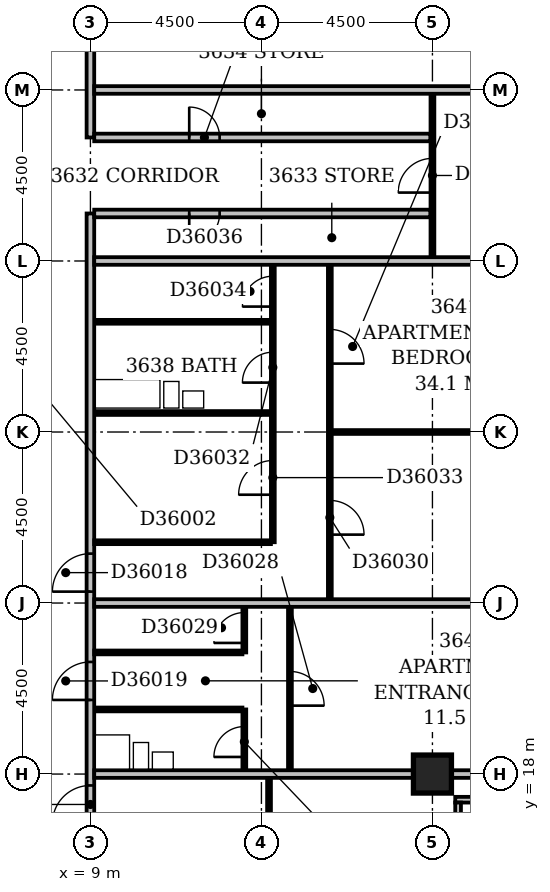
"""IFC4 building model, lengths in metres.
Left out: names, types, materials, properties, quantities, classifications, styles, units other than length and angle.
Written with IfcOpenShell. Run it as: python <this file> out.ifc"""

import sys

from ifc_helpers import new_model, si_unit, direction, frame, frame_2d, origin, origin_2d, place, context, subcontext, project, spatial, rectangle, extrude, element, fill, save


model = new_model("IFC4")
c1 = context("Model", 3, precision=1e-05, world=origin(), true_north=direction((0.0, 1.0)))
c2 = subcontext(c1, "Body", "Model", "MODEL_VIEW")
j1 = project(units=[si_unit("LENGTHUNIT", "METRE"), si_unit("PLANEANGLEUNIT", "RADIAN")], contexts=[c1])
p1 = place(None, origin())
s1 = spatial("IfcSite", under=j1, at=p1, CompositionType="ELEMENT")
p2 = place(p1, origin())
s2 = spatial("IfcBuilding", under=s1, at=p2, CompositionType="ELEMENT")
p3 = place(p2, frame((0.0, 0.0, 144.8)))
s3 = spatial("IfcBuildingStorey", under=s2, at=p3, CompositionType="ELEMENT", Elevation=144.8)
p4 = place(p3, frame((18.0, 18.0, -0.3), z_axis=(0.0, 0.0, 1.0), x_axis=(1.0, 0.0, 0.0)))
e1 = element("IfcColumn", 1, at=p4, inside=s3, PredefinedType="COLUMN", context=c2, shape_type="SweptSolid", body=[
    extrude(rectangle(XDim=1.0, YDim=1.0, at=origin_2d()), origin(), (0.0, 0.0, 1.0), 3.6),
])
p5 = place(p3, frame((18.675, 8.4, 0.0), z_axis=(0.0, 0.0, 1.0), x_axis=(0.0, 1.0, 0.0)))
e2 = element("IfcWall", 2, at=p5, inside=s3, PredefinedType="STANDARD", context=c2, shape_type="SweptSolid", body=[
    extrude(rectangle(XDim=8.85, YDim=0.15, at=frame_2d((4.425, 0.0))), origin(), (0.0, 0.0, 1.0), 2.7),
])
p6 = place(p5, frame((1.368, 0.0, 0.6)))
e3 = element("IfcOpeningElement", 3, at=p6, cuts=e2, PredefinedType="OPENING", context=c2, shape_type="SweptSolid", body=[
    extrude(rectangle(XDim=0.6, YDim=1.8, at=frame_2d((0.3, 0.9))), frame((0.0, 0.087, 0.0), z_axis=(0.0, -1.0, 0.0), x_axis=(1.0, 0.0, 0.0)), (0.0, 0.0, 1.0), 0.174),
])
p7 = place(p5, frame((3.422, 0.0, 0.6)))
e4 = element("IfcOpeningElement", 4, at=p7, cuts=e2, PredefinedType="OPENING", context=c2, shape_type="SweptSolid", body=[
    extrude(rectangle(XDim=0.9, YDim=1.8, at=frame_2d((0.45, 0.9))), frame((0.0, 0.087, 0.0), z_axis=(0.0, -1.0, 0.0), x_axis=(1.0, 0.0, 0.0)), (0.0, 0.0, 1.0), 0.174),
])
p8 = place(p5, frame((6.15, 0.0, 0.6)))
e5 = element("IfcOpeningElement", 5, at=p8, cuts=e2, PredefinedType="OPENING", context=c2, shape_type="SweptSolid", body=[
    extrude(rectangle(XDim=2.4, YDim=1.8, at=frame_2d((1.2, 0.9))), frame((0.0, 0.087, 0.0), z_axis=(0.0, -1.0, 0.0), x_axis=(1.0, 0.0, 0.0)), (0.0, 0.0, 1.0), 0.174),
])
p9 = place(p3, frame((18.6, 17.325, 0.0), z_axis=(0.0, 0.0, 1.0), x_axis=(1.0, 0.0, 0.0)))
e6 = element("IfcWall", 6, at=p9, inside=s3, PredefinedType="STANDARD", context=c2, shape_type="SweptSolid", body=[
    extrude(rectangle(XDim=4.65, YDim=0.15, at=frame_2d((2.325, 0.0))), origin(), (0.0, 0.0, 1.0), 2.7),
])
p10 = place(p9, frame((0.45, 0.0, 0.6)))
e7 = element("IfcOpeningElement", 7, at=p10, cuts=e6, PredefinedType="OPENING", context=c2, shape_type="SweptSolid", body=[
    extrude(rectangle(XDim=2.4, YDim=1.8, at=frame_2d((1.2, 0.9))), frame((0.0, 0.087, 0.0), z_axis=(0.0, -1.0, 0.0), x_axis=(1.0, 0.0, 0.0)), (0.0, 0.0, 1.0), 0.174),
])
p11 = place(p3, frame((9.0, 5.0, 0.0), z_axis=(0.0, 0.0, 1.0), x_axis=(0.0, 1.0, 0.0)))
e8 = element("IfcWall", 8, at=p11, inside=s3, PredefinedType="PARTITIONING", context=c2, shape_type="SweptSolid", body=[
    extrude(rectangle(XDim=27.75, YDim=0.2, at=frame_2d((13.875, 0.0))), origin(), (0.0, 0.0, 1.0), 3.3),
])
p12 = place(p11, frame((17.8, 0.0, 0.0)))
e9 = element("IfcOpeningElement", 9, at=p12, cuts=e8, PredefinedType="OPENING", context=c2, shape_type="SweptSolid", body=[
    extrude(rectangle(XDim=1.0, YDim=2.1, at=frame_2d((0.5, 1.05))), frame((0.0, 0.112, 0.0), z_axis=(0.0, -1.0, 0.0), x_axis=(1.0, 0.0, 0.0)), (0.0, 0.0, 1.0), 0.224),
])
p13 = place(p11, frame((14.95, 0.0, 0.0)))
e10 = element("IfcOpeningElement", 10, at=p13, cuts=e8, PredefinedType="OPENING", context=c2, shape_type="SweptSolid", body=[
    extrude(rectangle(XDim=1.0, YDim=2.1, at=frame_2d((0.5, 1.05))), frame((0.0, 0.112, 0.0), z_axis=(0.0, -1.0, 0.0), x_axis=(1.0, 0.0, 0.0)), (0.0, 0.0, 1.0), 0.224),
])
p14 = place(p11, frame((11.7, 0.0, 0.0)))
e11 = element("IfcOpeningElement", 11, at=p14, cuts=e8, PredefinedType="OPENING", context=c2, shape_type="SweptSolid", body=[
    extrude(rectangle(XDim=1.0, YDim=2.1, at=frame_2d((0.5, 1.05))), frame((0.0, 0.112, 0.0), z_axis=(0.0, -1.0, 0.0), x_axis=(1.0, 0.0, 0.0)), (0.0, 0.0, 1.0), 0.224),
])
p15 = place(p11, frame((1.5, 0.0, 0.0)))
e12 = element("IfcOpeningElement", 12, at=p15, cuts=e8, PredefinedType="OPENING", context=c2, shape_type="SweptSolid", body=[
    extrude(rectangle(XDim=0.9, YDim=2.1, at=frame_2d((0.45, 1.05))), frame((0.0, 0.112, 0.0), z_axis=(0.0, -1.0, 0.0), x_axis=(1.0, 0.0, 0.0)), (0.0, 0.0, 1.0), 0.224),
])
p16 = place(p3, frame((13.7, 9.5, 0.0), z_axis=(0.0, 0.0, 1.0), x_axis=(0.0, 1.0, 0.0)))
e13 = element("IfcWall", 13, at=p16, inside=s3, PredefinedType="PARTITIONING", context=c2, shape_type="SweptSolid", body=[
    extrude(rectangle(XDim=8.4, YDim=0.1, at=frame_2d((4.2, 0.0))), origin(), (0.0, 0.0, 1.0), 3.3),
])
p17 = place(p16, frame((1.3, 0.0, 0.0)))
e14 = element("IfcOpeningElement", 14, at=p17, cuts=e13, PredefinedType="OPENING", context=c2, shape_type="SweptSolid", body=[
    extrude(rectangle(XDim=0.9, YDim=2.1, at=frame_2d((0.45, 1.05))), frame((0.0, 0.062, 0.0), z_axis=(0.0, -1.0, 0.0), x_axis=(1.0, 0.0, 0.0)), (0.0, 0.0, 1.0), 0.124),
])
p18 = place(p16, frame((5.8, 0.0, 0.0)))
e15 = element("IfcOpeningElement", 15, at=p18, cuts=e13, PredefinedType="OPENING", context=c2, shape_type="SweptSolid", body=[
    extrude(rectangle(XDim=0.9, YDim=2.1, at=frame_2d((0.45, 1.05))), frame((0.0, 0.062, 0.0), z_axis=(0.0, -1.0, 0.0), x_axis=(1.0, 0.0, 0.0)), (0.0, 0.0, 1.0), 0.124),
])
p19 = place(p3, frame((9.1, 18.0, 0.0), z_axis=(0.0, 0.0, 1.0), x_axis=(1.0, 0.0, 0.0)))
e16 = element("IfcWall", 16, at=p19, inside=s3, PredefinedType="PARTITIONING", context=c2, shape_type="SweptSolid", body=[
    extrude(rectangle(XDim=8.4, YDim=0.2, at=frame_2d((4.2, 0.0))), origin(), (0.0, 0.0, 1.0), 2.6),
])
p20 = place(p3, frame((18.5, 18.0, 0.0), z_axis=(0.0, 0.0, 1.0), x_axis=(1.0, 0.0, 0.0)))
e17 = element("IfcWall", 17, at=p20, inside=s3, PredefinedType="PARTITIONING", context=c2, shape_type="SweptSolid", body=[
    extrude(rectangle(XDim=3.5, YDim=0.2, at=frame_2d((1.75, 0.0))), origin(), (0.0, 0.0, 1.0), 2.7),
])
p21 = place(p3, frame((13.05, 18.1, 0.0), z_axis=(0.0, 0.0, 1.0), x_axis=(0.0, 1.0, 0.0)))
e18 = element("IfcWall", 18, at=p21, inside=s3, PredefinedType="PARTITIONING", context=c2, shape_type="SweptSolid", body=[
    extrude(rectangle(XDim=1.6, YDim=0.1, at=frame_2d((0.8, 0.0))), origin(), (0.0, 0.0, 1.0), 3.3),
])
p22 = place(p21, frame((0.35, 0.0, 0.0)))
e19 = element("IfcOpeningElement", 19, at=p22, cuts=e18, PredefinedType="OPENING", context=c2, shape_type="SweptSolid", body=[
    extrude(rectangle(XDim=0.8, YDim=2.1, at=frame_2d((0.4, 1.05))), frame((0.0, 0.062, 0.0), z_axis=(0.0, -1.0, 0.0), x_axis=(1.0, 0.0, 0.0)), (0.0, 0.0, 1.0), 0.124),
])
p23 = place(p3, frame((14.25, 18.1, 0.0), z_axis=(0.0, 0.0, 1.0), x_axis=(0.0, 1.0, 0.0)))
e20 = element("IfcWall", 20, at=p23, inside=s3, PredefinedType="PARTITIONING", context=c2, shape_type="SweptSolid", body=[
    extrude(rectangle(XDim=4.3, YDim=0.1, at=frame_2d((2.15, 0.0))), origin(), (0.0, 0.0, 1.0), 3.3),
])
p24 = place(p23, frame((1.7, 0.0, 0.0)))
e21 = element("IfcOpeningElement", 21, at=p24, cuts=e20, PredefinedType="OPENING", context=c2, shape_type="SweptSolid", body=[
    extrude(rectangle(XDim=0.9, YDim=2.1, at=frame_2d((0.45, 1.05))), frame((0.0, 0.062, 0.0), z_axis=(0.0, -1.0, 0.0), x_axis=(1.0, 0.0, 0.0)), (0.0, 0.0, 1.0), 0.124),
])
p25 = place(p3, frame((9.1, 19.7, 0.0), z_axis=(0.0, 0.0, 1.0), x_axis=(1.0, 0.0, 0.0)))
e22 = element("IfcWall", 22, at=p25, inside=s3, PredefinedType="PLUMBINGWALL", context=c2, shape_type="SweptSolid", body=[
    extrude(rectangle(XDim=3.9, YDim=0.1, at=frame_2d((1.95, 0.0))), origin(), (0.0, 0.0, 1.0), 3.3),
])
p26 = place(p3, frame((9.1, 21.2, 0.0), z_axis=(0.0, 0.0, 1.0), x_axis=(1.0, 0.0, 0.0)))
e23 = element("IfcWall", 23, at=p26, inside=s3, PredefinedType="PARTITIONING", context=c2, shape_type="SweptSolid", body=[
    extrude(rectangle(XDim=3.9, YDim=0.1, at=frame_2d((1.95, 0.0))), origin(), (0.0, 0.0, 1.0), 3.3),
])
p27 = place(p3, frame((13.05, 21.2, 0.0), z_axis=(0.0, 0.0, 1.0), x_axis=(0.0, 1.0, 0.0)))
e24 = element("IfcWall", 24, at=p27, inside=s3, PredefinedType="PARTITIONING", context=c2, shape_type="SweptSolid", body=[
    extrude(rectangle(XDim=1.2, YDim=0.1, at=frame_2d((0.6, 0.0))), origin(), (0.0, 0.0, 1.0), 3.3),
])
p28 = place(p27, frame((0.25, 0.0, 0.0)))
e25 = element("IfcOpeningElement", 25, at=p28, cuts=e24, PredefinedType="OPENING", context=c2, shape_type="SweptSolid", body=[
    extrude(rectangle(XDim=0.8, YDim=2.1, at=frame_2d((0.4, 1.05))), frame((0.0, 0.062, 0.0), z_axis=(0.0, -1.0, 0.0), x_axis=(1.0, 0.0, 0.0)), (0.0, 0.0, 1.0), 0.124),
])
p29 = place(p3, frame((9.1, 22.5, 0.0), z_axis=(0.0, 0.0, 1.0), x_axis=(1.0, 0.0, 0.0)))
e26 = element("IfcWall", 26, at=p29, inside=s3, PredefinedType="PARTITIONING", context=c2, shape_type="SweptSolid", body=[
    extrude(rectangle(XDim=12.9, YDim=0.2, at=frame_2d((6.45, 0.0))), origin(), (0.0, 0.0, 1.0), 3.3),
])
p30 = place(p3, frame((15.3, 22.6, 0.0), z_axis=(0.0, 0.0, 1.0), x_axis=(0.0, 1.0, 0.0)))
e27 = element("IfcWall", 27, at=p30, inside=s3, PredefinedType="PARTITIONING", context=c2, shape_type="SweptSolid", body=[
    extrude(rectangle(XDim=8.8, YDim=0.1, at=frame_2d((4.4, 0.0))), origin(), (0.0, 0.0, 1.0), 3.3),
])
p31 = place(p30, frame((1.7, 0.0, 0.0)))
e28 = element("IfcOpeningElement", 28, at=p31, cuts=e27, PredefinedType="OPENING", context=c2, shape_type="SweptSolid", body=[
    extrude(rectangle(XDim=0.9, YDim=2.1, at=frame_2d((0.45, 1.05))), frame((0.0, 0.062, 0.0), z_axis=(0.0, -1.0, 0.0), x_axis=(1.0, 0.0, 0.0)), (0.0, 0.0, 1.0), 0.124),
])
p32 = place(p30, frame((6.2, 0.0, 0.0)))
e29 = element("IfcOpeningElement", 29, at=p32, cuts=e27, PredefinedType="OPENING", context=c2, shape_type="SweptSolid", body=[
    extrude(rectangle(XDim=0.9, YDim=2.1, at=frame_2d((0.45, 1.05))), frame((0.0, 0.062, 0.0), z_axis=(0.0, -1.0, 0.0), x_axis=(1.0, 0.0, 0.0)), (0.0, 0.0, 1.0), 0.124),
])
p33 = place(p3, frame((9.1, 24.1, 0.0), z_axis=(0.0, 0.0, 1.0), x_axis=(1.0, 0.0, 0.0)))
e30 = element("IfcWall", 30, at=p33, inside=s3, PredefinedType="PARTITIONING", context=c2, shape_type="SweptSolid", body=[
    extrude(rectangle(XDim=4.65, YDim=0.1, at=frame_2d((2.325, 0.0))), origin(), (0.0, 0.0, 1.0), 3.3),
])
p34 = place(p3, frame((13.8, 24.1, 0.0), z_axis=(0.0, 0.0, 1.0), x_axis=(0.0, 1.0, 0.0)))
e31 = element("IfcWall", 31, at=p34, inside=s3, PredefinedType="PARTITIONING", context=c2, shape_type="SweptSolid", body=[
    extrude(rectangle(XDim=7.3, YDim=0.1, at=frame_2d((3.65, 0.0))), origin(), (0.0, 0.0, 1.0), 3.3),
])
p35 = place(p34, frame((4.2, 0.0, 0.0)))
e32 = element("IfcOpeningElement", 32, at=p35, cuts=e31, PredefinedType="OPENING", context=c2, shape_type="SweptSolid", body=[
    extrude(rectangle(XDim=0.8, YDim=2.1, at=frame_2d((0.4, 1.05))), frame((0.0, 0.062, 0.0), z_axis=(0.0, -1.0, 0.0), x_axis=(1.0, 0.0, 0.0)), (0.0, 0.0, 1.0), 0.124),
])
p36 = place(p34, frame((1.25, 0.0, 0.0)))
e33 = element("IfcOpeningElement", 33, at=p36, cuts=e31, PredefinedType="OPENING", context=c2, shape_type="SweptSolid", body=[
    extrude(rectangle(XDim=0.9, YDim=2.1, at=frame_2d((0.45, 1.05))), frame((0.0, 0.062, 0.0), z_axis=(0.0, -1.0, 0.0), x_axis=(1.0, 0.0, 0.0)), (0.0, 0.0, 1.0), 0.124),
])
p37 = place(p34, frame((6.2, 0.0, 0.0)))
e34 = element("IfcOpeningElement", 34, at=p37, cuts=e31, PredefinedType="OPENING", context=c2, shape_type="SweptSolid", body=[
    extrude(rectangle(XDim=0.8, YDim=2.1, at=frame_2d((0.4, 1.05))), frame((0.0, 0.062, 0.0), z_axis=(0.0, -1.0, 0.0), x_axis=(1.0, 0.0, 0.0)), (0.0, 0.0, 1.0), 0.124),
])
p38 = place(p3, frame((15.35, 27.0, 0.0), z_axis=(0.0, 0.0, 1.0), x_axis=(1.0, 0.0, 0.0)))
e35 = element("IfcWall", 35, at=p38, inside=s3, PredefinedType="PARTITIONING", context=c2, shape_type="SweptSolid", body=[
    extrude(rectangle(XDim=6.65, YDim=0.1, at=frame_2d((3.325, 0.0))), origin(), (0.0, 0.0, 1.0), 2.7),
])
p39 = place(p3, frame((9.1, 27.5, 0.0), z_axis=(0.0, 0.0, 1.0), x_axis=(1.0, 0.0, 0.0)))
e36 = element("IfcWall", 36, at=p39, inside=s3, PredefinedType="PLUMBINGWALL", context=c2, shape_type="SweptSolid", body=[
    extrude(rectangle(XDim=4.65, YDim=0.1, at=frame_2d((2.325, 0.0))), origin(), (0.0, 0.0, 1.0), 2.7),
])
p40 = place(p3, frame((9.1, 29.9, 0.0), z_axis=(0.0, 0.0, 1.0), x_axis=(1.0, 0.0, 0.0)))
e37 = element("IfcWall", 37, at=p40, inside=s3, PredefinedType="PLUMBINGWALL", context=c2, shape_type="SweptSolid", body=[
    extrude(rectangle(XDim=4.65, YDim=0.1, at=frame_2d((2.325, 0.0))), origin(), (0.0, 0.0, 1.0), 3.3),
])
p41 = place(p3, frame((9.1, 31.5, 0.0), z_axis=(0.0, 0.0, 1.0), x_axis=(1.0, 0.0, 0.0)))
e38 = element("IfcWall", 38, at=p41, inside=s3, PredefinedType="PARTITIONING", context=c2, shape_type="SweptSolid", body=[
    extrude(rectangle(XDim=12.9, YDim=0.2, at=frame_2d((6.45, 0.0))), origin(), (0.0, 0.0, 1.0), 3.3),
])
p42 = place(p3, frame((18.0, 31.6, 0.0), z_axis=(0.0, 0.0, 1.0), x_axis=(0.0, 1.0, 0.0)))
e39 = element("IfcWall", 39, at=p42, inside=s3, PredefinedType="PARTITIONING", context=c2, shape_type="SweptSolid", body=[
    extrude(rectangle(XDim=4.3, YDim=0.1, at=frame_2d((2.15, 0.0))), origin(), (0.0, 0.0, 1.0), 3.3),
])
p43 = place(p42, frame((1.7, 0.0, 0.0)))
e40 = element("IfcOpeningElement", 40, at=p43, cuts=e39, PredefinedType="OPENING", context=c2, shape_type="SweptSolid", body=[
    extrude(rectangle(XDim=0.9, YDim=2.1, at=frame_2d((0.45, 1.05))), frame((0.0, 0.062, 0.0), z_axis=(0.0, -1.0, 0.0), x_axis=(1.0, 0.0, 0.0)), (0.0, 0.0, 1.0), 0.124),
])
p44 = place(p3, frame((9.1, 32.75, 0.0), z_axis=(0.0, 0.0, 1.0), x_axis=(1.0, 0.0, 0.0)))
e41 = element("IfcWall", 41, at=p44, inside=s3, PredefinedType="PARTITIONING", context=c2, shape_type="SweptSolid", body=[
    extrude(rectangle(XDim=8.85, YDim=0.2, at=frame_2d((4.425, 0.0))), origin(), (0.0, 0.0, 1.0), 3.3),
])
p45 = place(p44, frame((2.5, 0.0, 0.0)))
e42 = element("IfcOpeningElement", 42, at=p45, cuts=e41, PredefinedType="OPENING", context=c2, shape_type="SweptSolid", body=[
    extrude(rectangle(XDim=0.8, YDim=2.1, at=frame_2d((0.4, 1.05))), frame((0.0, 0.112, 0.0), z_axis=(0.0, -1.0, 0.0), x_axis=(1.0, 0.0, 0.0)), (0.0, 0.0, 1.0), 0.224),
])
p46 = place(p3, frame((9.0, 34.75, 0.0), z_axis=(0.0, 0.0, 1.0), x_axis=(0.0, 1.0, 0.0)))
e43 = element("IfcWall", 43, at=p46, inside=s3, PredefinedType="PARTITIONING", context=c2, shape_type="SweptSolid", body=[
    extrude(rectangle(XDim=14.75, YDim=0.2, at=frame_2d((7.375, 0.0))), origin(), (0.0, 0.0, 1.0), 3.3),
])
p47 = place(p46, frame((5.25, 0.0, 0.0)))
e44 = element("IfcOpeningElement", 44, at=p47, cuts=e43, PredefinedType="OPENING", context=c2, shape_type="SweptSolid", body=[
    extrude(rectangle(XDim=0.9, YDim=2.1, at=frame_2d((0.45, 1.05))), frame((0.0, 0.112, 0.0), z_axis=(0.0, -1.0, 0.0), x_axis=(1.0, 0.0, 0.0)), (0.0, 0.0, 1.0), 0.224),
])
p48 = place(p3, frame((9.1, 34.75, 0.0), z_axis=(0.0, 0.0, 1.0), x_axis=(1.0, 0.0, 0.0)))
e45 = element("IfcWall", 45, at=p48, inside=s3, PredefinedType="PARTITIONING", context=c2, shape_type="SweptSolid", body=[
    extrude(rectangle(XDim=8.85, YDim=0.2, at=frame_2d((4.425, 0.0))), origin(), (0.0, 0.0, 1.0), 3.3),
])
p49 = place(p48, frame((2.5, 0.0, 0.0)))
e46 = element("IfcOpeningElement", 46, at=p49, cuts=e45, PredefinedType="OPENING", context=c2, shape_type="SweptSolid", body=[
    extrude(rectangle(XDim=0.8, YDim=2.1, at=frame_2d((0.4, 1.05))), frame((0.0, 0.112, 0.0), z_axis=(0.0, -1.0, 0.0), x_axis=(1.0, 0.0, 0.0)), (0.0, 0.0, 1.0), 0.224),
])
p50 = place(p3, frame((9.1, 36.0, 0.0), z_axis=(0.0, 0.0, 1.0), x_axis=(1.0, 0.0, 0.0)))
e47 = element("IfcWall", 47, at=p50, inside=s3, PredefinedType="PARTITIONING", context=c2, shape_type="SweptSolid", body=[
    extrude(rectangle(XDim=12.9, YDim=0.2, at=frame_2d((6.45, 0.0))), origin(), (0.0, 0.0, 1.0), 3.3),
])
p51 = place(p12, origin())
e48 = element("IfcDoor", 48, at=p51, inside=s3, OperationType="SINGLE_SWING_LEFT", PredefinedType="DOOR", context=c2, shape_type="SweptSolid", body=[
    extrude(rectangle(XDim=1.0, YDim=2.1, at=frame_2d((0.5, 1.05))), frame((0.0, 0.025, 0.0), z_axis=(0.0, -1.0, 0.0), x_axis=(1.0, 0.0, 0.0)), (0.0, 0.0, 1.0), 0.05),
])
fill(e9, e48)
p52 = place(p13, origin())
e49 = element("IfcDoor", 49, at=p52, inside=s3, OperationType="SINGLE_SWING_LEFT", PredefinedType="DOOR", context=c2, shape_type="SweptSolid", body=[
    extrude(rectangle(XDim=1.0, YDim=2.1, at=frame_2d((0.5, 1.05))), frame((0.0, 0.025, 0.0), z_axis=(0.0, -1.0, 0.0), x_axis=(1.0, 0.0, 0.0)), (0.0, 0.0, 1.0), 0.05),
])
fill(e10, e49)
p53 = place(p14, origin())
e50 = element("IfcDoor", 50, at=p53, inside=s3, OperationType="SINGLE_SWING_LEFT", PredefinedType="DOOR", context=c2, shape_type="SweptSolid", body=[
    extrude(rectangle(XDim=1.0, YDim=2.1, at=frame_2d((0.5, 1.05))), frame((0.0, 0.025, 0.0), z_axis=(0.0, -1.0, 0.0), x_axis=(1.0, 0.0, 0.0)), (0.0, 0.0, 1.0), 0.05),
])
fill(e11, e50)
p54 = place(p22, origin())
e51 = element("IfcDoor", 51, at=p54, inside=s3, OperationType="SINGLE_SWING_LEFT", PredefinedType="DOOR", context=c2, shape_type="SweptSolid", body=[
    extrude(rectangle(XDim=0.8, YDim=2.1, at=frame_2d((0.4, 1.05))), frame((0.0, 0.025, 0.0), z_axis=(0.0, -1.0, 0.0), x_axis=(1.0, 0.0, 0.0)), (0.0, 0.0, 1.0), 0.05),
])
fill(e19, e51)
p55 = place(p24, frame((0.9, 0.0, 0.0), z_axis=(0.0, 0.0, 1.0), x_axis=(-1.0, 0.0, 0.0)))
e52 = element("IfcDoor", 52, at=p55, inside=s3, OperationType="SINGLE_SWING_RIGHT", PredefinedType="DOOR", context=c2, shape_type="SweptSolid", body=[
    extrude(rectangle(XDim=0.9, YDim=2.1, at=frame_2d((0.45, 1.05))), frame((0.0, 0.025, 0.0), z_axis=(0.0, -1.0, 0.0), x_axis=(1.0, 0.0, 0.0)), (0.0, 0.0, 1.0), 0.05),
])
fill(e21, e52)
p56 = place(p28, origin())
e53 = element("IfcDoor", 53, at=p56, inside=s3, OperationType="SINGLE_SWING_LEFT", PredefinedType="DOOR", context=c2, shape_type="SweptSolid", body=[
    extrude(rectangle(XDim=0.8, YDim=2.1, at=frame_2d((0.4, 1.05))), frame((0.0, 0.025, 0.0), z_axis=(0.0, -1.0, 0.0), x_axis=(1.0, 0.0, 0.0)), (0.0, 0.0, 1.0), 0.05),
])
fill(e25, e53)
p57 = place(p31, frame((0.9, 0.0, 0.0), z_axis=(0.0, 0.0, 1.0), x_axis=(-1.0, 0.0, 0.0)))
e54 = element("IfcDoor", 54, at=p57, inside=s3, OperationType="SINGLE_SWING_RIGHT", PredefinedType="DOOR", context=c2, shape_type="SweptSolid", body=[
    extrude(rectangle(XDim=0.9, YDim=2.1, at=frame_2d((0.45, 1.05))), frame((0.0, 0.025, 0.0), z_axis=(0.0, -1.0, 0.0), x_axis=(1.0, 0.0, 0.0)), (0.0, 0.0, 1.0), 0.05),
])
fill(e28, e54)
p58 = place(p32, frame((0.9, 0.0, 0.0), z_axis=(0.0, 0.0, 1.0), x_axis=(-1.0, 0.0, 0.0)))
e55 = element("IfcDoor", 55, at=p58, inside=s3, OperationType="SINGLE_SWING_RIGHT", PredefinedType="DOOR", context=c2, shape_type="SweptSolid", body=[
    extrude(rectangle(XDim=0.9, YDim=2.1, at=frame_2d((0.45, 1.05))), frame((0.0, 0.025, 0.0), z_axis=(0.0, -1.0, 0.0), x_axis=(1.0, 0.0, 0.0)), (0.0, 0.0, 1.0), 0.05),
])
fill(e29, e55)
p59 = place(p35, origin())
e56 = element("IfcDoor", 56, at=p59, inside=s3, OperationType="SINGLE_SWING_LEFT", PredefinedType="DOOR", context=c2, shape_type="SweptSolid", body=[
    extrude(rectangle(XDim=0.8, YDim=2.1, at=frame_2d((0.4, 1.05))), frame((0.0, 0.025, 0.0), z_axis=(0.0, -1.0, 0.0), x_axis=(1.0, 0.0, 0.0)), (0.0, 0.0, 1.0), 0.05),
])
fill(e32, e56)
p60 = place(p36, origin())
e57 = element("IfcDoor", 57, at=p60, inside=s3, OperationType="SINGLE_SWING_LEFT", PredefinedType="DOOR", context=c2, shape_type="SweptSolid", body=[
    extrude(rectangle(XDim=0.9, YDim=2.1, at=frame_2d((0.45, 1.05))), frame((0.0, 0.025, 0.0), z_axis=(0.0, -1.0, 0.0), x_axis=(1.0, 0.0, 0.0)), (0.0, 0.0, 1.0), 0.05),
])
fill(e33, e57)
p61 = place(p37, origin())
e58 = element("IfcDoor", 58, at=p61, inside=s3, OperationType="SINGLE_SWING_LEFT", PredefinedType="DOOR", context=c2, shape_type="SweptSolid", body=[
    extrude(rectangle(XDim=0.8, YDim=2.1, at=frame_2d((0.4, 1.05))), frame((0.0, 0.025, 0.0), z_axis=(0.0, -1.0, 0.0), x_axis=(1.0, 0.0, 0.0)), (0.0, 0.0, 1.0), 0.05),
])
fill(e34, e58)
p62 = place(p43, origin())
e59 = element("IfcDoor", 59, at=p62, inside=s3, OperationType="SINGLE_SWING_LEFT", PredefinedType="DOOR", context=c2, shape_type="SweptSolid", body=[
    extrude(rectangle(XDim=0.9, YDim=2.1, at=frame_2d((0.45, 1.05))), frame((0.0, 0.025, 0.0), z_axis=(0.0, -1.0, 0.0), x_axis=(1.0, 0.0, 0.0)), (0.0, 0.0, 1.0), 0.05),
])
fill(e40, e59)
p63 = place(p45, frame((0.8, 0.0, 0.0), z_axis=(0.0, 0.0, 1.0), x_axis=(-1.0, 0.0, 0.0)))
e60 = element("IfcDoor", 60, at=p63, inside=s3, OperationType="SINGLE_SWING_RIGHT", PredefinedType="DOOR", context=c2, shape_type="SweptSolid", body=[
    extrude(rectangle(XDim=0.8, YDim=2.1, at=frame_2d((0.4, 1.05))), frame((0.0, 0.025, 0.0), z_axis=(0.0, -1.0, 0.0), x_axis=(1.0, 0.0, 0.0)), (0.0, 0.0, 1.0), 0.05),
])
fill(e42, e60)
p64 = place(p49, origin())
e61 = element("IfcDoor", 61, at=p64, inside=s3, OperationType="SINGLE_SWING_LEFT", PredefinedType="DOOR", context=c2, shape_type="SweptSolid", body=[
    extrude(rectangle(XDim=0.8, YDim=2.1, at=frame_2d((0.4, 1.05))), frame((0.0, 0.025, 0.0), z_axis=(0.0, -1.0, 0.0), x_axis=(1.0, 0.0, 0.0)), (0.0, 0.0, 1.0), 0.05),
])
fill(e46, e61)
save(model, sys.argv[1])
